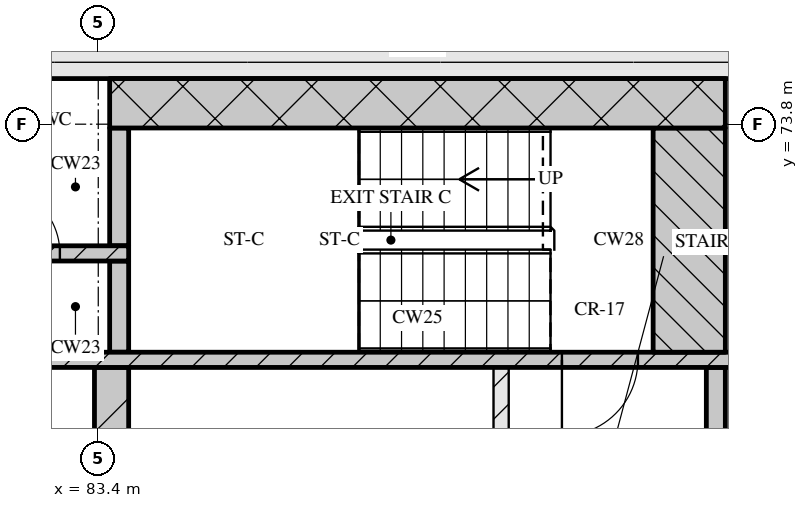
"""IFC4 building model, lengths in metres.
Left out: names, types, materials, properties, quantities, classifications, styles, units other than length and angle.
Written with IfcOpenShell. Run it as: python <this file> out.ifc"""

import sys

from ifc_helpers import new_model, si_unit, direction, frame, frame_2d, origin, place, context, subcontext, project, spatial, rectangle, extrude, element, fill, save


model = new_model("IFC4")
c1 = context("Model", 3, precision=1e-05, world=origin(), true_north=direction((0.0, 1.0)))
c2 = subcontext(c1, "Body", "Model", "MODEL_VIEW")
j1 = project(units=[si_unit("LENGTHUNIT", "METRE"), si_unit("PLANEANGLEUNIT", "RADIAN")], contexts=[c1])
p1 = place(None, origin())
s1 = spatial("IfcSite", under=j1, at=p1, CompositionType="ELEMENT")
p2 = place(p1, origin())
s2 = spatial("IfcBuilding", under=s1, at=p2, CompositionType="ELEMENT")
p3 = place(p2, frame((0.0, 0.0, 292.35)))
s3 = spatial("IfcBuildingStorey", under=s2, at=p3, CompositionType="ELEMENT", Elevation=292.35)
p4 = place(p3, frame((67.3, 74.65, 0.0), z_axis=(0.0, 0.0, 1.0), x_axis=(1.0, 0.0, 0.0)))
e1 = element("IfcWall", 1, at=p4, inside=s3, PredefinedType="SOLIDWALL", context=c2, shape_type="SweptSolid", body=[
    extrude(rectangle(XDim=40.6, YDim=0.5, at=frame_2d((20.3, 0.0))), origin(), (0.0, 0.0, 1.0), 3.32),
])
p5 = place(p3, frame((83.575, 68.0, 0.0), z_axis=(0.0, 0.0, 1.0), x_axis=(0.0, 1.0, 0.0)))
e2 = element("IfcWall", 2, at=p5, inside=s3, PredefinedType="SOLIDWALL", context=c2, shape_type="SweptSolid", body=[
    extrude(rectangle(XDim=2.6, YDim=0.45, at=frame_2d((1.3, 0.0))), origin(), (0.0, 0.0, 1.0), 3.32),
])
p6 = place(p3, frame((88.7, 68.0, 0.0), z_axis=(0.0, 0.0, 1.0), x_axis=(0.0, 1.0, 0.0)))
e3 = element("IfcWall", 3, at=p6, inside=s3, PredefinedType="PARTITIONING", context=c2, shape_type="SweptSolid", body=[
    extrude(rectangle(XDim=2.6, YDim=0.2, at=frame_2d((1.3, 0.0))), origin(), (0.0, 0.0, 1.0), 3.32),
])
p7 = place(p3, frame((91.525, 68.0, 0.0), z_axis=(0.0, 0.0, 1.0), x_axis=(0.0, 1.0, 0.0)))
e4 = element("IfcWall", 4, at=p7, inside=s3, PredefinedType="SOLIDWALL", context=c2, shape_type="SweptSolid", body=[
    extrude(rectangle(XDim=2.6, YDim=0.25, at=frame_2d((1.3, 0.0))), origin(), (0.0, 0.0, 1.0), 3.32),
])
p8 = place(p3, frame((67.8, 70.7, 0.0), z_axis=(0.0, 0.0, 1.0), x_axis=(1.0, 0.0, 0.0)))
e5 = element("IfcWall", 5, at=p8, inside=s3, PredefinedType="SOLIDWALL", context=c2, shape_type="SweptSolid", body=[
    extrude(rectangle(XDim=39.6, YDim=0.2, at=frame_2d((19.8, 0.0))), origin(), (0.0, 0.0, 1.0), 3.32),
])
p9 = place(p8, frame((0.65, 0.0, 0.0)))
e6 = element("IfcOpeningElement", 6, at=p9, cuts=e5, PredefinedType="OPENING", context=c2, shape_type="SweptSolid", body=[
    extrude(rectangle(XDim=1.1, YDim=2.1, at=frame_2d((0.55, 1.05))), frame((0.0, 0.11, 0.0), z_axis=(0.0, -1.0, 0.0), x_axis=(1.0, 0.0, 0.0)), (0.0, 0.0, 1.0), 0.22),
])
p10 = place(p8, frame((3.25, 0.0, 0.0)))
e7 = element("IfcOpeningElement", 7, at=p10, cuts=e5, PredefinedType="OPENING", context=c2, shape_type="SweptSolid", body=[
    extrude(rectangle(XDim=1.1, YDim=2.1, at=frame_2d((0.55, 1.05))), frame((0.0, 0.11, 0.0), z_axis=(0.0, -1.0, 0.0), x_axis=(1.0, 0.0, 0.0)), (0.0, 0.0, 1.0), 0.22),
])
p11 = place(p8, frame((5.9, 0.0, 0.0)))
e8 = element("IfcOpeningElement", 8, at=p11, cuts=e5, PredefinedType="OPENING", context=c2, shape_type="SweptSolid", body=[
    extrude(rectangle(XDim=1.0, YDim=2.1, at=frame_2d((0.5, 1.05))), frame((0.0, 0.11, 0.0), z_axis=(0.0, -1.0, 0.0), x_axis=(1.0, 0.0, 0.0)), (0.0, 0.0, 1.0), 0.22),
])
p12 = place(p8, frame((21.7, 0.0, 0.0)))
e9 = element("IfcOpeningElement", 9, at=p12, cuts=e5, PredefinedType="OPENING", context=c2, shape_type="SweptSolid", body=[
    extrude(rectangle(XDim=1.0, YDim=2.1, at=frame_2d((0.5, 1.05))), frame((0.0, 0.11, 0.0), z_axis=(0.0, -1.0, 0.0), x_axis=(1.0, 0.0, 0.0)), (0.0, 0.0, 1.0), 0.22),
])
p13 = place(p8, frame((32.7, 0.0, 0.0)))
e10 = element("IfcOpeningElement", 10, at=p13, cuts=e5, PredefinedType="OPENING", context=c2, shape_type="SweptSolid", body=[
    extrude(rectangle(XDim=1.0, YDim=2.1, at=frame_2d((0.5, 1.05))), frame((0.0, 0.11, 0.0), z_axis=(0.0, -1.0, 0.0), x_axis=(1.0, 0.0, 0.0)), (0.0, 0.0, 1.0), 0.22),
])
p14 = place(p8, frame((35.25, 0.0, 0.0)))
e11 = element("IfcOpeningElement", 11, at=p14, cuts=e5, PredefinedType="OPENING", context=c2, shape_type="SweptSolid", body=[
    extrude(rectangle(XDim=1.1, YDim=2.1, at=frame_2d((0.55, 1.05))), frame((0.0, 0.11, 0.0), z_axis=(0.0, -1.0, 0.0), x_axis=(1.0, 0.0, 0.0)), (0.0, 0.0, 1.0), 0.22),
])
p15 = place(p8, frame((37.85, 0.0, 0.0)))
e12 = element("IfcOpeningElement", 12, at=p15, cuts=e5, PredefinedType="OPENING", context=c2, shape_type="SweptSolid", body=[
    extrude(rectangle(XDim=1.1, YDim=2.1, at=frame_2d((0.55, 1.05))), frame((0.0, 0.11, 0.0), z_axis=(0.0, -1.0, 0.0), x_axis=(1.0, 0.0, 0.0)), (0.0, 0.0, 1.0), 0.22),
])
p16 = place(p3, frame((83.675, 70.8, 0.0), z_axis=(0.0, 0.0, 1.0), x_axis=(0.0, 1.0, 0.0)))
e13 = element("IfcWall", 13, at=p16, inside=s3, PredefinedType="SOLIDWALL", context=c2, shape_type="SweptSolid", body=[
    extrude(rectangle(XDim=1.2, YDim=0.25, at=frame_2d((0.6, 0.0))), origin(), (0.0, 0.0, 1.0), 3.32),
])
p17 = place(p3, frame((91.175, 70.8, 0.0), z_axis=(0.0, 0.0, 1.0), x_axis=(0.0, 1.0, 0.0)))
e14 = element("IfcWall", 14, at=p17, inside=s3, PredefinedType="SOLIDWALL", context=c2, shape_type="SweptSolid", body=[
    extrude(rectangle(XDim=2.95, YDim=0.95, at=frame_2d((1.475, 0.0))), origin(), (0.0, 0.0, 1.0), 3.32),
])
p18 = place(p3, frame((72.8, 72.1, 0.0), z_axis=(0.0, 0.0, 1.0), x_axis=(1.0, 0.0, 0.0)))
e15 = element("IfcWall", 15, at=p18, inside=s3, PredefinedType="SOLIDWALL", context=c2, shape_type="SweptSolid", body=[
    extrude(rectangle(XDim=11.0, YDim=0.2, at=frame_2d((5.5, 0.0))), origin(), (0.0, 0.0, 1.0), 3.32),
])
p19 = place(p18, frame((1.25, 0.0, 0.0)))
e16 = element("IfcOpeningElement", 16, at=p19, cuts=e15, PredefinedType="OPENING", context=c2, shape_type="SweptSolid", body=[
    extrude(rectangle(XDim=0.9, YDim=2.1, at=frame_2d((0.45, 1.05))), frame((0.0, 0.11, 0.0), z_axis=(0.0, -1.0, 0.0), x_axis=(1.0, 0.0, 0.0)), (0.0, 0.0, 1.0), 0.22),
])
p20 = place(p18, frame((3.85, 0.0, 0.0)))
e17 = element("IfcOpeningElement", 17, at=p20, cuts=e15, PredefinedType="OPENING", context=c2, shape_type="SweptSolid", body=[
    extrude(rectangle(XDim=0.9, YDim=2.1, at=frame_2d((0.45, 1.05))), frame((0.0, 0.11, 0.0), z_axis=(0.0, -1.0, 0.0), x_axis=(1.0, 0.0, 0.0)), (0.0, 0.0, 1.0), 0.22),
])
p21 = place(p18, frame((6.42, 0.0, 0.0)))
e18 = element("IfcOpeningElement", 18, at=p21, cuts=e15, PredefinedType="OPENING", context=c2, shape_type="SweptSolid", body=[
    extrude(rectangle(XDim=0.9, YDim=2.1, at=frame_2d((0.45, 1.05))), frame((0.0, 0.11, 0.0), z_axis=(0.0, -1.0, 0.0), x_axis=(1.0, 0.0, 0.0)), (0.0, 0.0, 1.0), 0.22),
])
p22 = place(p18, frame((9.195, 0.0, 0.0)))
e19 = element("IfcOpeningElement", 19, at=p22, cuts=e15, PredefinedType="OPENING", context=c2, shape_type="SweptSolid", body=[
    extrude(rectangle(XDim=0.9, YDim=2.1, at=frame_2d((0.45, 1.05))), frame((0.0, 0.11, 0.0), z_axis=(0.0, -1.0, 0.0), x_axis=(1.0, 0.0, 0.0)), (0.0, 0.0, 1.0), 0.22),
])
p23 = place(p3, frame((83.675, 72.2, 0.0), z_axis=(0.0, 0.0, 1.0), x_axis=(0.0, 1.0, 0.0)))
e20 = element("IfcWall", 20, at=p23, inside=s3, PredefinedType="SOLIDWALL", context=c2, shape_type="SweptSolid", body=[
    extrude(rectangle(XDim=1.55, YDim=0.25, at=frame_2d((0.775, 0.0))), origin(), (0.0, 0.0, 1.0), 3.32),
])
p24 = place(p3, frame((83.55, 74.075, 0.0), z_axis=(0.0, 0.0, 1.0), x_axis=(1.0, 0.0, 0.0)))
e21 = element("IfcWall", 21, at=p24, inside=s3, PredefinedType="SOLIDWALL", context=c2, shape_type="SweptSolid", body=[
    extrude(rectangle(XDim=8.1, YDim=0.65, at=frame_2d((4.05, 0.0))), origin(), (0.0, 0.0, 1.0), 3.32),
])
p25 = place(p12, origin())
e22 = element("IfcDoor", 22, at=p25, inside=s3, OperationType="SINGLE_SWING_RIGHT", PredefinedType="DOOR", context=c2, shape_type="SweptSolid", body=[
    extrude(rectangle(XDim=1.0, YDim=2.1, at=frame_2d((0.5, 1.05))), frame((0.0, 0.025, 0.0), z_axis=(0.0, -1.0, 0.0), x_axis=(1.0, 0.0, 0.0)), (0.0, 0.0, 1.0), 0.05),
])
fill(e9, e22)
p26 = place(p22, origin())
e23 = element("IfcDoor", 23, at=p26, inside=s3, OperationType="SINGLE_SWING_LEFT", PredefinedType="DOOR", context=c2, shape_type="SweptSolid", body=[
    extrude(rectangle(XDim=0.9, YDim=2.1, at=frame_2d((0.45, 1.05))), frame((0.0, 0.025, 0.0), z_axis=(0.0, -1.0, 0.0), x_axis=(1.0, 0.0, 0.0)), (0.0, 0.0, 1.0), 0.05),
])
fill(e19, e23)
save(model, sys.argv[1])
